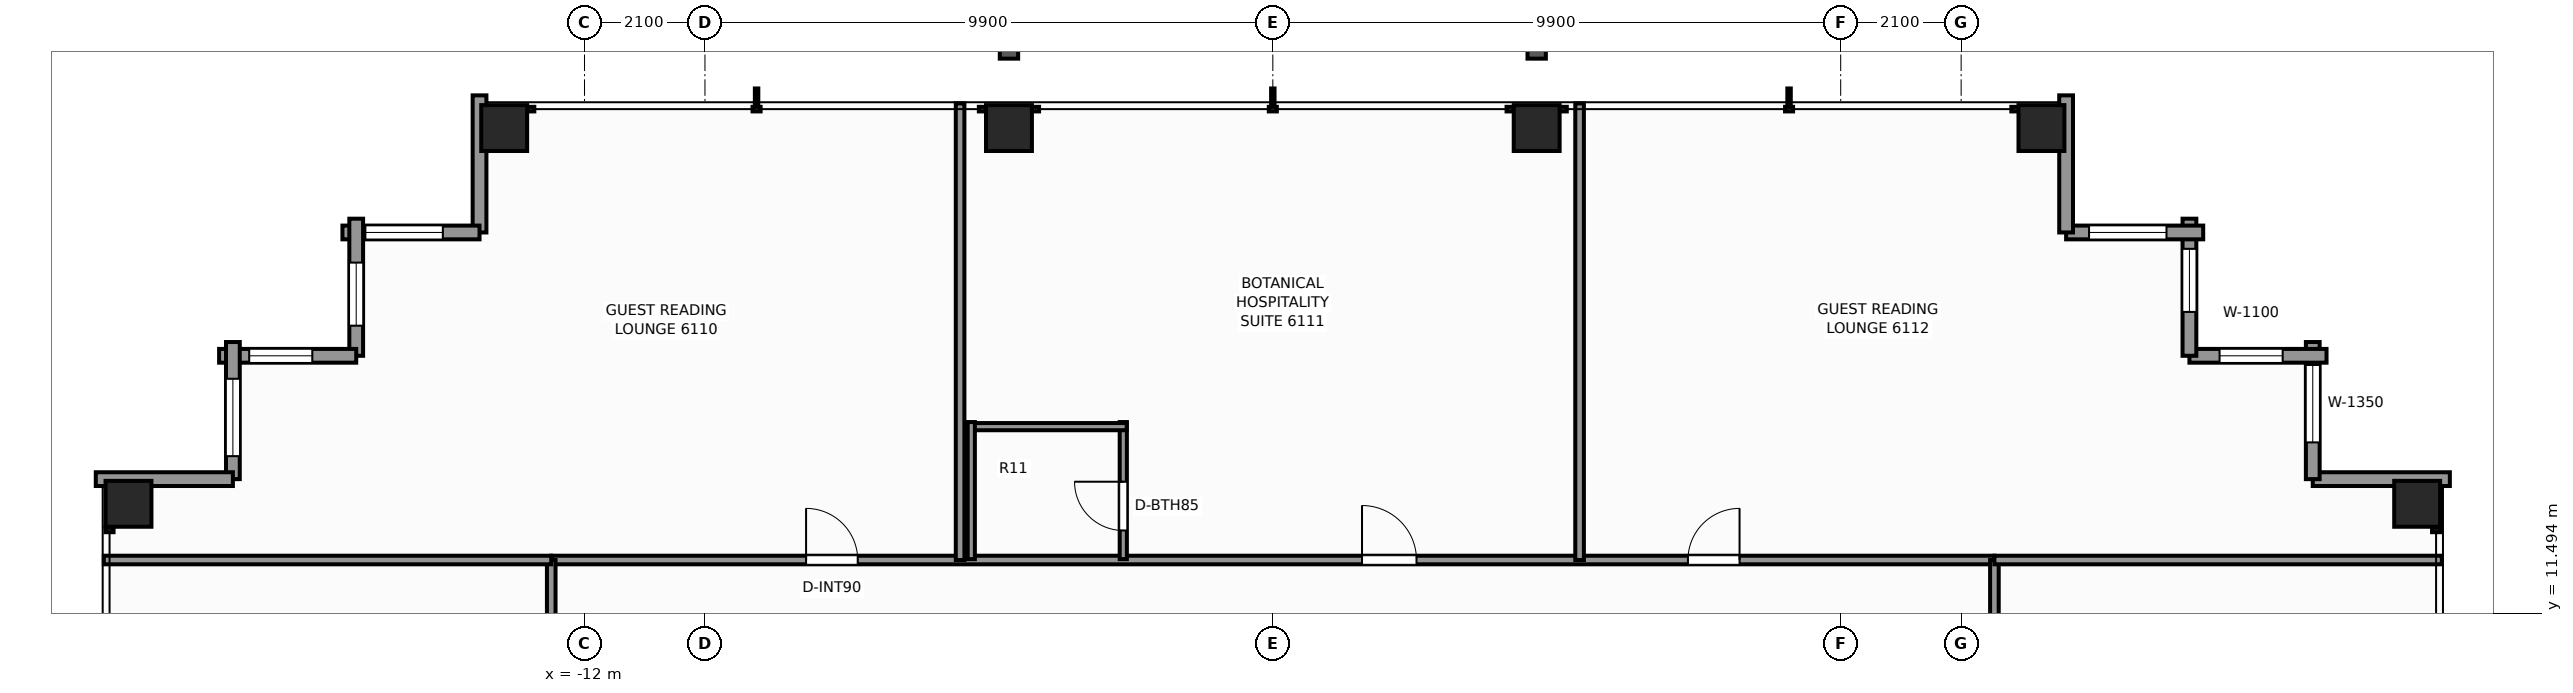
"""IFC4 building model, lengths in metres.
Left out: names, types, materials, properties, quantities, classifications, styles, units other than length and angle.
Written with IfcOpenShell. Run it as: python <this file> out.ifc"""

import sys

from ifc_helpers import new_model, si_unit, direction, frame, frame_2d, origin, origin_2d, place, context, subcontext, project, spatial, rectangle, extrude, element, fill, save


model = new_model("IFC4")
c1 = context("Model", 3, precision=1e-05, world=origin(), true_north=direction((0.0, 1.0)))
c2 = subcontext(c1, "Body", "Model", "MODEL_VIEW")
j1 = project(units=[si_unit("LENGTHUNIT", "METRE"), si_unit("PLANEANGLEUNIT", "RADIAN")], contexts=[c1])
p1 = place(None, origin())
s1 = spatial("IfcSite", under=j1, at=p1, CompositionType="ELEMENT")
p2 = place(p1, origin())
s2 = spatial("IfcBuilding", under=s1, at=p2, CompositionType="ELEMENT")
p3 = place(p2, frame((0.0, 0.0, 209.7)))
s3 = spatial("IfcBuildingStorey", under=s2, at=p3, CompositionType="ELEMENT", Elevation=209.7)
for number, where, z_axis, x_axis in (
    (1, (-13.4, 19.95, 0.0), (0.0, 0.0, 1.0), (1.0, 0.0, 0.0)),
    (2, (-4.6, 19.95, 0.0), (0.0, 0.0, 1.0), (1.0, 0.0, 0.0)),
    (3, (4.6, 19.95, 0.0), (0.0, 0.0, 1.0), (1.0, 0.0, 0.0)),
    (4, (13.4, 19.95, 0.0), (0.0, 0.0, 1.0), (1.0, 0.0, 0.0)),
    (5, (-19.95, 13.4, 0.0), (0.0, 0.0, 1.0), (1.0, 0.0, 0.0)),
    (6, (19.95, 13.4, 0.0), (0.0, 0.0, 1.0), (1.0, 0.0, 0.0)),
):
    element("IfcColumn", number, at=place(p3, frame(where, z_axis=z_axis, x_axis=x_axis)), inside=s3, PredefinedType="COLUMN", context=c2, shape_type="SweptSolid", body=[
        extrude(rectangle(XDim=0.8, YDim=0.8, at=origin_2d()), origin(), (0.0, 0.0, 1.0), 3.3),
    ])
p4 = place(p3, frame((18.13, 13.83, 0.0), z_axis=(0.0, 0.0, 1.0), x_axis=(1.0, 0.0, 0.0)))
e7 = element("IfcWall", 7, at=p4, inside=s3, PredefinedType="STANDARD", context=c2, shape_type="SweptSolid", body=[
    extrude(rectangle(XDim=2.39, YDim=0.24, at=frame_2d((1.195, 0.0))), origin(), (0.0, 0.0, 1.0), 2.463),
])
p5 = place(p3, frame((18.13, 16.22, 0.0), z_axis=(0.0, 0.0, 1.0), x_axis=(0.0, -1.0, 0.0)))
e8 = element("IfcWall", 8, at=p5, inside=s3, PredefinedType="STANDARD", context=c2, shape_type="SweptSolid", body=[
    extrude(rectangle(XDim=2.39, YDim=0.24, at=frame_2d((1.195, 0.0))), origin(), (0.0, 0.0, 1.0), 2.463),
])
p6 = place(p5, frame((0.4, 0.0, 0.65)))
e9 = element("IfcOpeningElement", 9, at=p6, cuts=e8, PredefinedType="OPENING", context=c2, shape_type="SweptSolid", body=[
    extrude(rectangle(XDim=1.35, YDim=1.55, at=frame_2d((0.675, 0.775))), frame((0.0, 0.13, 0.0), z_axis=(0.0, -1.0, 0.0), x_axis=(1.0, 0.0, 0.0)), (0.0, 0.0, 1.0), 0.26),
])
p7 = place(p3, frame((15.98, 15.98, 0.0), z_axis=(0.0, 0.0, 1.0), x_axis=(1.0, 0.0, 0.0)))
e10 = element("IfcWall", 10, at=p7, inside=s3, PredefinedType="STANDARD", context=c2, shape_type="SweptSolid", body=[
    extrude(rectangle(XDim=2.39, YDim=0.24, at=frame_2d((1.195, 0.0))), origin(), (0.0, 0.0, 1.0), 2.463),
])
p8 = place(p7, frame((0.525, 0.0, 0.65)))
e11 = element("IfcOpeningElement", 11, at=p8, cuts=e10, PredefinedType="OPENING", context=c2, shape_type="SweptSolid", body=[
    extrude(rectangle(XDim=1.1, YDim=1.45, at=frame_2d((0.55, 0.725))), frame((0.0, 0.13, 0.0), z_axis=(0.0, -1.0, 0.0), x_axis=(1.0, 0.0, 0.0)), (0.0, 0.0, 1.0), 0.26),
])
p9 = place(p3, frame((15.98, 18.37, 0.0), z_axis=(0.0, 0.0, 1.0), x_axis=(0.0, -1.0, 0.0)))
e12 = element("IfcWall", 12, at=p9, inside=s3, PredefinedType="STANDARD", context=c2, shape_type="SweptSolid", body=[
    extrude(rectangle(XDim=2.39, YDim=0.24, at=frame_2d((1.195, 0.0))), origin(), (0.0, 0.0, 1.0), 2.463),
])
p10 = place(p9, frame((0.525, 0.0, 0.65)))
e13 = element("IfcOpeningElement", 13, at=p10, cuts=e12, PredefinedType="OPENING", context=c2, shape_type="SweptSolid", body=[
    extrude(rectangle(XDim=1.1, YDim=1.45, at=frame_2d((0.55, 0.725))), frame((0.0, 0.13, 0.0), z_axis=(0.0, -1.0, 0.0), x_axis=(1.0, 0.0, 0.0)), (0.0, 0.0, 1.0), 0.26),
])
p11 = place(p3, frame((13.83, 18.13, 0.0), z_axis=(0.0, 0.0, 1.0), x_axis=(1.0, 0.0, 0.0)))
e14 = element("IfcWall", 14, at=p11, inside=s3, PredefinedType="STANDARD", context=c2, shape_type="SweptSolid", body=[
    extrude(rectangle(XDim=2.39, YDim=0.24, at=frame_2d((1.195, 0.0))), origin(), (0.0, 0.0, 1.0), 2.463),
])
p12 = place(p11, frame((0.4, 0.0, 0.65)))
e15 = element("IfcOpeningElement", 15, at=p12, cuts=e14, PredefinedType="OPENING", context=c2, shape_type="SweptSolid", body=[
    extrude(rectangle(XDim=1.35, YDim=1.55, at=frame_2d((0.675, 0.775))), frame((0.0, 0.13, 0.0), z_axis=(0.0, -1.0, 0.0), x_axis=(1.0, 0.0, 0.0)), (0.0, 0.0, 1.0), 0.26),
])
for number, where, z_axis, x_axis in (
    (16, (13.83, 20.52, 0.0), (0.0, 0.0, 1.0), (0.0, -1.0, 0.0)),
    (17, (-13.83, 18.13, 0.0), (0.0, 0.0, 1.0), (0.0, 1.0, 0.0)),
):
    element("IfcWall", number, at=place(p3, frame(where, z_axis=z_axis, x_axis=x_axis)), inside=s3, PredefinedType="STANDARD", context=c2, shape_type="SweptSolid", body=[
        extrude(rectangle(XDim=2.39, YDim=0.24, at=frame_2d((1.195, 0.0))), origin(), (0.0, 0.0, 1.0), 2.463),
    ])
p13 = place(p3, frame((-16.22, 18.13, 0.0), z_axis=(0.0, 0.0, 1.0), x_axis=(1.0, 0.0, 0.0)))
e18 = element("IfcWall", 18, at=p13, inside=s3, PredefinedType="STANDARD", context=c2, shape_type="SweptSolid", body=[
    extrude(rectangle(XDim=2.39, YDim=0.24, at=frame_2d((1.195, 0.0))), origin(), (0.0, 0.0, 1.0), 2.463),
])
p14 = place(p13, frame((0.4, 0.0, 0.65)))
e19 = element("IfcOpeningElement", 19, at=p14, cuts=e18, PredefinedType="OPENING", context=c2, shape_type="SweptSolid", body=[
    extrude(rectangle(XDim=1.35, YDim=1.55, at=frame_2d((0.675, 0.775))), frame((0.0, 0.13, 0.0), z_axis=(0.0, -1.0, 0.0), x_axis=(1.0, 0.0, 0.0)), (0.0, 0.0, 1.0), 0.26),
])
p15 = place(p3, frame((-15.98, 15.98, 0.0), z_axis=(0.0, 0.0, 1.0), x_axis=(0.0, 1.0, 0.0)))
e20 = element("IfcWall", 20, at=p15, inside=s3, PredefinedType="STANDARD", context=c2, shape_type="SweptSolid", body=[
    extrude(rectangle(XDim=2.39, YDim=0.24, at=frame_2d((1.195, 0.0))), origin(), (0.0, 0.0, 1.0), 2.463),
])
p16 = place(p15, frame((0.525, 0.0, 0.65)))
e21 = element("IfcOpeningElement", 21, at=p16, cuts=e20, PredefinedType="OPENING", context=c2, shape_type="SweptSolid", body=[
    extrude(rectangle(XDim=1.1, YDim=1.45, at=frame_2d((0.55, 0.725))), frame((0.0, 0.13, 0.0), z_axis=(0.0, -1.0, 0.0), x_axis=(1.0, 0.0, 0.0)), (0.0, 0.0, 1.0), 0.26),
])
p17 = place(p3, frame((-18.37, 15.98, 0.0), z_axis=(0.0, 0.0, 1.0), x_axis=(1.0, 0.0, 0.0)))
e22 = element("IfcWall", 22, at=p17, inside=s3, PredefinedType="STANDARD", context=c2, shape_type="SweptSolid", body=[
    extrude(rectangle(XDim=2.39, YDim=0.24, at=frame_2d((1.195, 0.0))), origin(), (0.0, 0.0, 1.0), 2.463),
])
p18 = place(p17, frame((0.525, 0.0, 0.65)))
e23 = element("IfcOpeningElement", 23, at=p18, cuts=e22, PredefinedType="OPENING", context=c2, shape_type="SweptSolid", body=[
    extrude(rectangle(XDim=1.1, YDim=1.45, at=frame_2d((0.55, 0.725))), frame((0.0, 0.13, 0.0), z_axis=(0.0, -1.0, 0.0), x_axis=(1.0, 0.0, 0.0)), (0.0, 0.0, 1.0), 0.26),
])
p19 = place(p3, frame((-18.13, 13.83, 0.0), z_axis=(0.0, 0.0, 1.0), x_axis=(0.0, 1.0, 0.0)))
e24 = element("IfcWall", 24, at=p19, inside=s3, PredefinedType="STANDARD", context=c2, shape_type="SweptSolid", body=[
    extrude(rectangle(XDim=2.39, YDim=0.24, at=frame_2d((1.195, 0.0))), origin(), (0.0, 0.0, 1.0), 2.463),
])
p20 = place(p19, frame((0.4, 0.0, 0.65)))
e25 = element("IfcOpeningElement", 25, at=p20, cuts=e24, PredefinedType="OPENING", context=c2, shape_type="SweptSolid", body=[
    extrude(rectangle(XDim=1.35, YDim=1.55, at=frame_2d((0.675, 0.775))), frame((0.0, 0.13, 0.0), z_axis=(0.0, -1.0, 0.0), x_axis=(1.0, 0.0, 0.0)), (0.0, 0.0, 1.0), 0.26),
])
p21 = place(p3, frame((-20.52, 13.83, 0.0), z_axis=(0.0, 0.0, 1.0), x_axis=(1.0, 0.0, 0.0)))
e26 = element("IfcWall", 26, at=p21, inside=s3, PredefinedType="STANDARD", context=c2, shape_type="SweptSolid", body=[
    extrude(rectangle(XDim=2.39, YDim=0.24, at=frame_2d((1.195, 0.0))), origin(), (0.0, 0.0, 1.0), 2.463),
])
p22 = place(p3, frame((-12.58, 12.42, 0.0), z_axis=(0.0, 0.0, 1.0), x_axis=(1.0, 0.0, 0.0)))
e27 = element("IfcWall", 27, at=p22, inside=s3, PredefinedType="PARTITIONING", context=c2, shape_type="SweptSolid", body=[
    extrude(rectangle(XDim=25.16, YDim=0.15, at=frame_2d((12.58, 0.0))), origin(), (0.0, 0.0, 1.0), 2.369),
])
p23 = place(p22, frame((4.443, 0.0, 0.0)))
e28 = element("IfcOpeningElement", 28, at=p23, cuts=e27, PredefinedType="OPENING", context=c2, shape_type="SweptSolid", body=[
    extrude(rectangle(XDim=0.9, YDim=2.06, at=frame_2d((0.45, 1.03))), frame((0.0, 0.085, 0.0), z_axis=(0.0, -1.0, 0.0), x_axis=(1.0, 0.0, 0.0)), (0.0, 0.0, 1.0), 0.17),
])
p24 = place(p22, frame((14.135, 0.0, 0.0)))
e29 = element("IfcOpeningElement", 29, at=p24, cuts=e27, PredefinedType="OPENING", context=c2, shape_type="SweptSolid", body=[
    extrude(rectangle(XDim=0.95, YDim=2.06, at=frame_2d((0.475, 1.03))), frame((0.0, 0.085, 0.0), z_axis=(0.0, -1.0, 0.0), x_axis=(1.0, 0.0, 0.0)), (0.0, 0.0, 1.0), 0.17),
])
p25 = place(p22, frame((19.817, 0.0, 0.0)))
e30 = element("IfcOpeningElement", 30, at=p25, cuts=e27, PredefinedType="OPENING", context=c2, shape_type="SweptSolid", body=[
    extrude(rectangle(XDim=0.9, YDim=2.06, at=frame_2d((0.45, 1.03))), frame((0.0, 0.085, 0.0), z_axis=(0.0, -1.0, 0.0), x_axis=(1.0, 0.0, 0.0)), (0.0, 0.0, 1.0), 0.17),
])
p26 = place(p3, frame((-12.58, -12.42, 0.0), z_axis=(0.0, 0.0, 1.0), x_axis=(0.0, 1.0, 0.0)))
e31 = element("IfcWall", 31, at=p26, inside=s3, PredefinedType="PARTITIONING", context=c2, shape_type="SweptSolid", body=[
    extrude(rectangle(XDim=24.84, YDim=0.15, at=frame_2d((12.42, 0.0))), origin(), (0.0, 0.0, 1.0), 2.369),
])
p27 = place(p26, frame((3.831, 0.0, 0.0)))
e32 = element("IfcOpeningElement", 32, at=p27, cuts=e31, PredefinedType="OPENING", context=c2, shape_type="SweptSolid", body=[
    extrude(rectangle(XDim=0.95, YDim=2.06, at=frame_2d((0.475, 1.03))), frame((0.0, 0.085, 0.0), z_axis=(0.0, -1.0, 0.0), x_axis=(1.0, 0.0, 0.0)), (0.0, 0.0, 1.0), 0.17),
])
p28 = place(p26, frame((9.915, 0.0, 0.0)))
e33 = element("IfcOpeningElement", 33, at=p28, cuts=e31, PredefinedType="OPENING", context=c2, shape_type="SweptSolid", body=[
    extrude(rectangle(XDim=0.95, YDim=2.06, at=frame_2d((0.475, 1.03))), frame((0.0, 0.085, 0.0), z_axis=(0.0, -1.0, 0.0), x_axis=(1.0, 0.0, 0.0)), (0.0, 0.0, 1.0), 0.17),
])
p29 = place(p26, frame((19.803, 0.0, 0.0)))
e34 = element("IfcOpeningElement", 34, at=p29, cuts=e31, PredefinedType="OPENING", context=c2, shape_type="SweptSolid", body=[
    extrude(rectangle(XDim=0.95, YDim=2.06, at=frame_2d((0.475, 1.03))), frame((0.0, 0.085, 0.0), z_axis=(0.0, -1.0, 0.0), x_axis=(1.0, 0.0, 0.0)), (0.0, 0.0, 1.0), 0.17),
])
p30 = place(p3, frame((12.58, -12.42, 0.0), z_axis=(0.0, 0.0, 1.0), x_axis=(0.0, 1.0, 0.0)))
e35 = element("IfcWall", 35, at=p30, inside=s3, PredefinedType="PARTITIONING", context=c2, shape_type="SweptSolid", body=[
    extrude(rectangle(XDim=24.84, YDim=0.15, at=frame_2d((12.42, 0.0))), origin(), (0.0, 0.0, 1.0), 2.369),
])
p31 = place(p30, frame((4.318, 0.0, 0.0)))
e36 = element("IfcOpeningElement", 36, at=p31, cuts=e35, PredefinedType="OPENING", context=c2, shape_type="SweptSolid", body=[
    extrude(rectangle(XDim=0.9, YDim=2.06, at=frame_2d((0.45, 1.03))), frame((0.0, 0.085, 0.0), z_axis=(0.0, -1.0, 0.0), x_axis=(1.0, 0.0, 0.0)), (0.0, 0.0, 1.0), 0.17),
])
p32 = place(p30, frame((9.94, 0.0, 0.0)))
e37 = element("IfcOpeningElement", 37, at=p32, cuts=e35, PredefinedType="OPENING", context=c2, shape_type="SweptSolid", body=[
    extrude(rectangle(XDim=0.9, YDim=2.06, at=frame_2d((0.45, 1.03))), frame((0.0, 0.085, 0.0), z_axis=(0.0, -1.0, 0.0), x_axis=(1.0, 0.0, 0.0)), (0.0, 0.0, 1.0), 0.17),
])
p33 = place(p30, frame((20.968, 0.0, 0.0)))
e38 = element("IfcOpeningElement", 38, at=p33, cuts=e35, PredefinedType="OPENING", context=c2, shape_type="SweptSolid", body=[
    extrude(rectangle(XDim=0.95, YDim=2.06, at=frame_2d((0.475, 1.03))), frame((0.0, 0.085, 0.0), z_axis=(0.0, -1.0, 0.0), x_axis=(1.0, 0.0, 0.0)), (0.0, 0.0, 1.0), 0.17),
])
for number, where, z_axis, x_axis in (
    (39, (-20.38, 12.42, 0.0), (0.0, 0.0, 1.0), (1.0, 0.0, 0.0)),
    (40, (12.58, 12.42, 0.0), (0.0, 0.0, 1.0), (1.0, 0.0, 0.0)),
):
    element("IfcWall", number, at=place(p3, frame(where, z_axis=z_axis, x_axis=x_axis)), inside=s3, PredefinedType="PARTITIONING", context=c2, shape_type="SweptSolid", body=[
        extrude(rectangle(XDim=7.8, YDim=0.15, at=frame_2d((3.9, 0.0))), origin(), (0.0, 0.0, 1.0), 2.369),
    ])
for number, where, z_axis, x_axis in (
    (41, (-5.452, 12.42, 0.0), (0.0, 0.0, 1.0), (0.0, 1.0, 0.0)),
    (42, (5.348, 12.42, 0.0), (0.0, 0.0, 1.0), (0.0, 1.0, 0.0)),
):
    element("IfcWall", number, at=place(p3, frame(where, z_axis=z_axis, x_axis=x_axis)), inside=s3, PredefinedType="PARTITIONING", context=c2, shape_type="SweptSolid", body=[
        extrude(rectangle(XDim=7.96, YDim=0.15, at=frame_2d((3.98, 0.0))), origin(), (0.0, 0.0, 1.0), 2.453),
    ])
p34 = place(p3, frame((-2.607, 12.435, 0.0), z_axis=(0.0, 0.0, 1.0), x_axis=(0.0, 1.0, 0.0)))
e43 = element("IfcWall", 43, at=p34, inside=s3, PredefinedType="PARTITIONING", context=c2, shape_type="SweptSolid", body=[
    extrude(rectangle(XDim=2.39, YDim=0.125, at=frame_2d((1.195, 0.0))), origin(), (0.0, 0.0, 1.0), 3.08),
])
p35 = place(p34, frame((0.5, 0.0, 0.0)))
e44 = element("IfcOpeningElement", 44, at=p35, cuts=e43, PredefinedType="OPENING", context=c2, shape_type="SweptSolid", body=[
    extrude(rectangle(XDim=0.85, YDim=2.03, at=frame_2d((0.425, 1.015))), frame((0.0, 0.073, 0.0), z_axis=(0.0, -1.0, 0.0), x_axis=(1.0, 0.0, 0.0)), (0.0, 0.0, 1.0), 0.145),
])
p36 = place(p3, frame((-5.317, 14.745, 0.0), z_axis=(0.0, 0.0, 1.0), x_axis=(1.0, 0.0, 0.0)))
e45 = element("IfcWall", 45, at=p36, inside=s3, PredefinedType="PARTITIONING", context=c2, shape_type="SweptSolid", body=[
    extrude(rectangle(XDim=2.77, YDim=0.125, at=frame_2d((1.385, 0.0))), origin(), (0.0, 0.0, 1.0), 2.369),
])
p37 = place(p3, frame((-5.257, 12.435, 0.0), z_axis=(0.0, 0.0, 1.0), x_axis=(0.0, 1.0, 0.0)))
e46 = element("IfcWall", 46, at=p37, inside=s3, PredefinedType="PARTITIONING", context=c2, shape_type="SweptSolid", body=[
    extrude(rectangle(XDim=2.39, YDim=0.125, at=frame_2d((1.195, 0.0))), origin(), (0.0, 0.0, 1.0), 3.08),
])
p38 = place(p6, origin())
e47 = element("IfcWindow", 47, at=p38, inside=s3, PartitioningType="SINGLE_PANEL", PredefinedType="WINDOW", context=c2, shape_type="SweptSolid", body=[
    extrude(rectangle(XDim=1.35, YDim=1.55, at=frame_2d((0.675, 0.775))), frame((0.0, 0.03, 0.0), z_axis=(0.0, -1.0, 0.0), x_axis=(1.0, 0.0, 0.0)), (0.0, 0.0, 1.0), 0.06),
])
fill(e9, e47)
p39 = place(p8, origin())
e48 = element("IfcWindow", 48, at=p39, inside=s3, PartitioningType="SINGLE_PANEL", PredefinedType="WINDOW", context=c2, shape_type="SweptSolid", body=[
    extrude(rectangle(XDim=1.1, YDim=1.45, at=frame_2d((0.55, 0.725))), frame((0.0, 0.03, 0.0), z_axis=(0.0, -1.0, 0.0), x_axis=(1.0, 0.0, 0.0)), (0.0, 0.0, 1.0), 0.06),
])
fill(e11, e48)
p40 = place(p10, origin())
e49 = element("IfcWindow", 49, at=p40, inside=s3, PartitioningType="SINGLE_PANEL", PredefinedType="WINDOW", context=c2, shape_type="SweptSolid", body=[
    extrude(rectangle(XDim=1.1, YDim=1.45, at=frame_2d((0.55, 0.725))), frame((0.0, 0.03, 0.0), z_axis=(0.0, -1.0, 0.0), x_axis=(1.0, 0.0, 0.0)), (0.0, 0.0, 1.0), 0.06),
])
fill(e13, e49)
p41 = place(p12, origin())
e50 = element("IfcWindow", 50, at=p41, inside=s3, PartitioningType="SINGLE_PANEL", PredefinedType="WINDOW", context=c2, shape_type="SweptSolid", body=[
    extrude(rectangle(XDim=1.35, YDim=1.55, at=frame_2d((0.675, 0.775))), frame((0.0, 0.03, 0.0), z_axis=(0.0, -1.0, 0.0), x_axis=(1.0, 0.0, 0.0)), (0.0, 0.0, 1.0), 0.06),
])
fill(e15, e50)
p42 = place(p14, origin())
e51 = element("IfcWindow", 51, at=p42, inside=s3, PartitioningType="SINGLE_PANEL", PredefinedType="WINDOW", context=c2, shape_type="SweptSolid", body=[
    extrude(rectangle(XDim=1.35, YDim=1.55, at=frame_2d((0.675, 0.775))), frame((0.0, 0.03, 0.0), z_axis=(0.0, -1.0, 0.0), x_axis=(1.0, 0.0, 0.0)), (0.0, 0.0, 1.0), 0.06),
])
fill(e19, e51)
p43 = place(p16, origin())
e52 = element("IfcWindow", 52, at=p43, inside=s3, PartitioningType="SINGLE_PANEL", PredefinedType="WINDOW", context=c2, shape_type="SweptSolid", body=[
    extrude(rectangle(XDim=1.1, YDim=1.45, at=frame_2d((0.55, 0.725))), frame((0.0, 0.03, 0.0), z_axis=(0.0, -1.0, 0.0), x_axis=(1.0, 0.0, 0.0)), (0.0, 0.0, 1.0), 0.06),
])
fill(e21, e52)
p44 = place(p18, origin())
e53 = element("IfcWindow", 53, at=p44, inside=s3, PartitioningType="SINGLE_PANEL", PredefinedType="WINDOW", context=c2, shape_type="SweptSolid", body=[
    extrude(rectangle(XDim=1.1, YDim=1.45, at=frame_2d((0.55, 0.725))), frame((0.0, 0.03, 0.0), z_axis=(0.0, -1.0, 0.0), x_axis=(1.0, 0.0, 0.0)), (0.0, 0.0, 1.0), 0.06),
])
fill(e23, e53)
p45 = place(p20, origin())
e54 = element("IfcWindow", 54, at=p45, inside=s3, PartitioningType="SINGLE_PANEL", PredefinedType="WINDOW", context=c2, shape_type="SweptSolid", body=[
    extrude(rectangle(XDim=1.35, YDim=1.55, at=frame_2d((0.675, 0.775))), frame((0.0, 0.03, 0.0), z_axis=(0.0, -1.0, 0.0), x_axis=(1.0, 0.0, 0.0)), (0.0, 0.0, 1.0), 0.06),
])
fill(e25, e54)
p46 = place(p23, origin())
e55 = element("IfcDoor", 55, at=p46, inside=s3, OperationType="SINGLE_SWING_LEFT", PredefinedType="DOOR", context=c2, shape_type="SweptSolid", body=[
    extrude(rectangle(XDim=0.9, YDim=2.06, at=frame_2d((0.45, 1.03))), frame((0.0, 0.025, 0.0), z_axis=(0.0, -1.0, 0.0), x_axis=(1.0, 0.0, 0.0)), (0.0, 0.0, 1.0), 0.05),
])
fill(e28, e55)
p47 = place(p35, origin())
e56 = element("IfcDoor", 56, at=p47, inside=s3, OperationType="SINGLE_SWING_RIGHT", PredefinedType="DOOR", context=c2, shape_type="SweptSolid", body=[
    extrude(rectangle(XDim=0.85, YDim=2.03, at=frame_2d((0.425, 1.015))), frame((0.0, 0.025, 0.0), z_axis=(0.0, -1.0, 0.0), x_axis=(1.0, 0.0, 0.0)), (0.0, 0.0, 1.0), 0.05),
])
fill(e44, e56)
p48 = place(p24, origin())
e57 = element("IfcDoor", 57, at=p48, inside=s3, OperationType="SINGLE_SWING_LEFT", PredefinedType="DOOR", context=c2, shape_type="SweptSolid", body=[
    extrude(rectangle(XDim=0.95, YDim=2.06, at=frame_2d((0.475, 1.03))), frame((0.0, 0.025, 0.0), z_axis=(0.0, -1.0, 0.0), x_axis=(1.0, 0.0, 0.0)), (0.0, 0.0, 1.0), 0.05),
])
fill(e29, e57)
p49 = place(p25, origin())
e58 = element("IfcDoor", 58, at=p49, inside=s3, OperationType="SINGLE_SWING_RIGHT", PredefinedType="DOOR", context=c2, shape_type="SweptSolid", body=[
    extrude(rectangle(XDim=0.9, YDim=2.06, at=frame_2d((0.45, 1.03))), frame((0.0, 0.025, 0.0), z_axis=(0.0, -1.0, 0.0), x_axis=(1.0, 0.0, 0.0)), (0.0, 0.0, 1.0), 0.05),
])
fill(e30, e58)
save(model, sys.argv[1])
